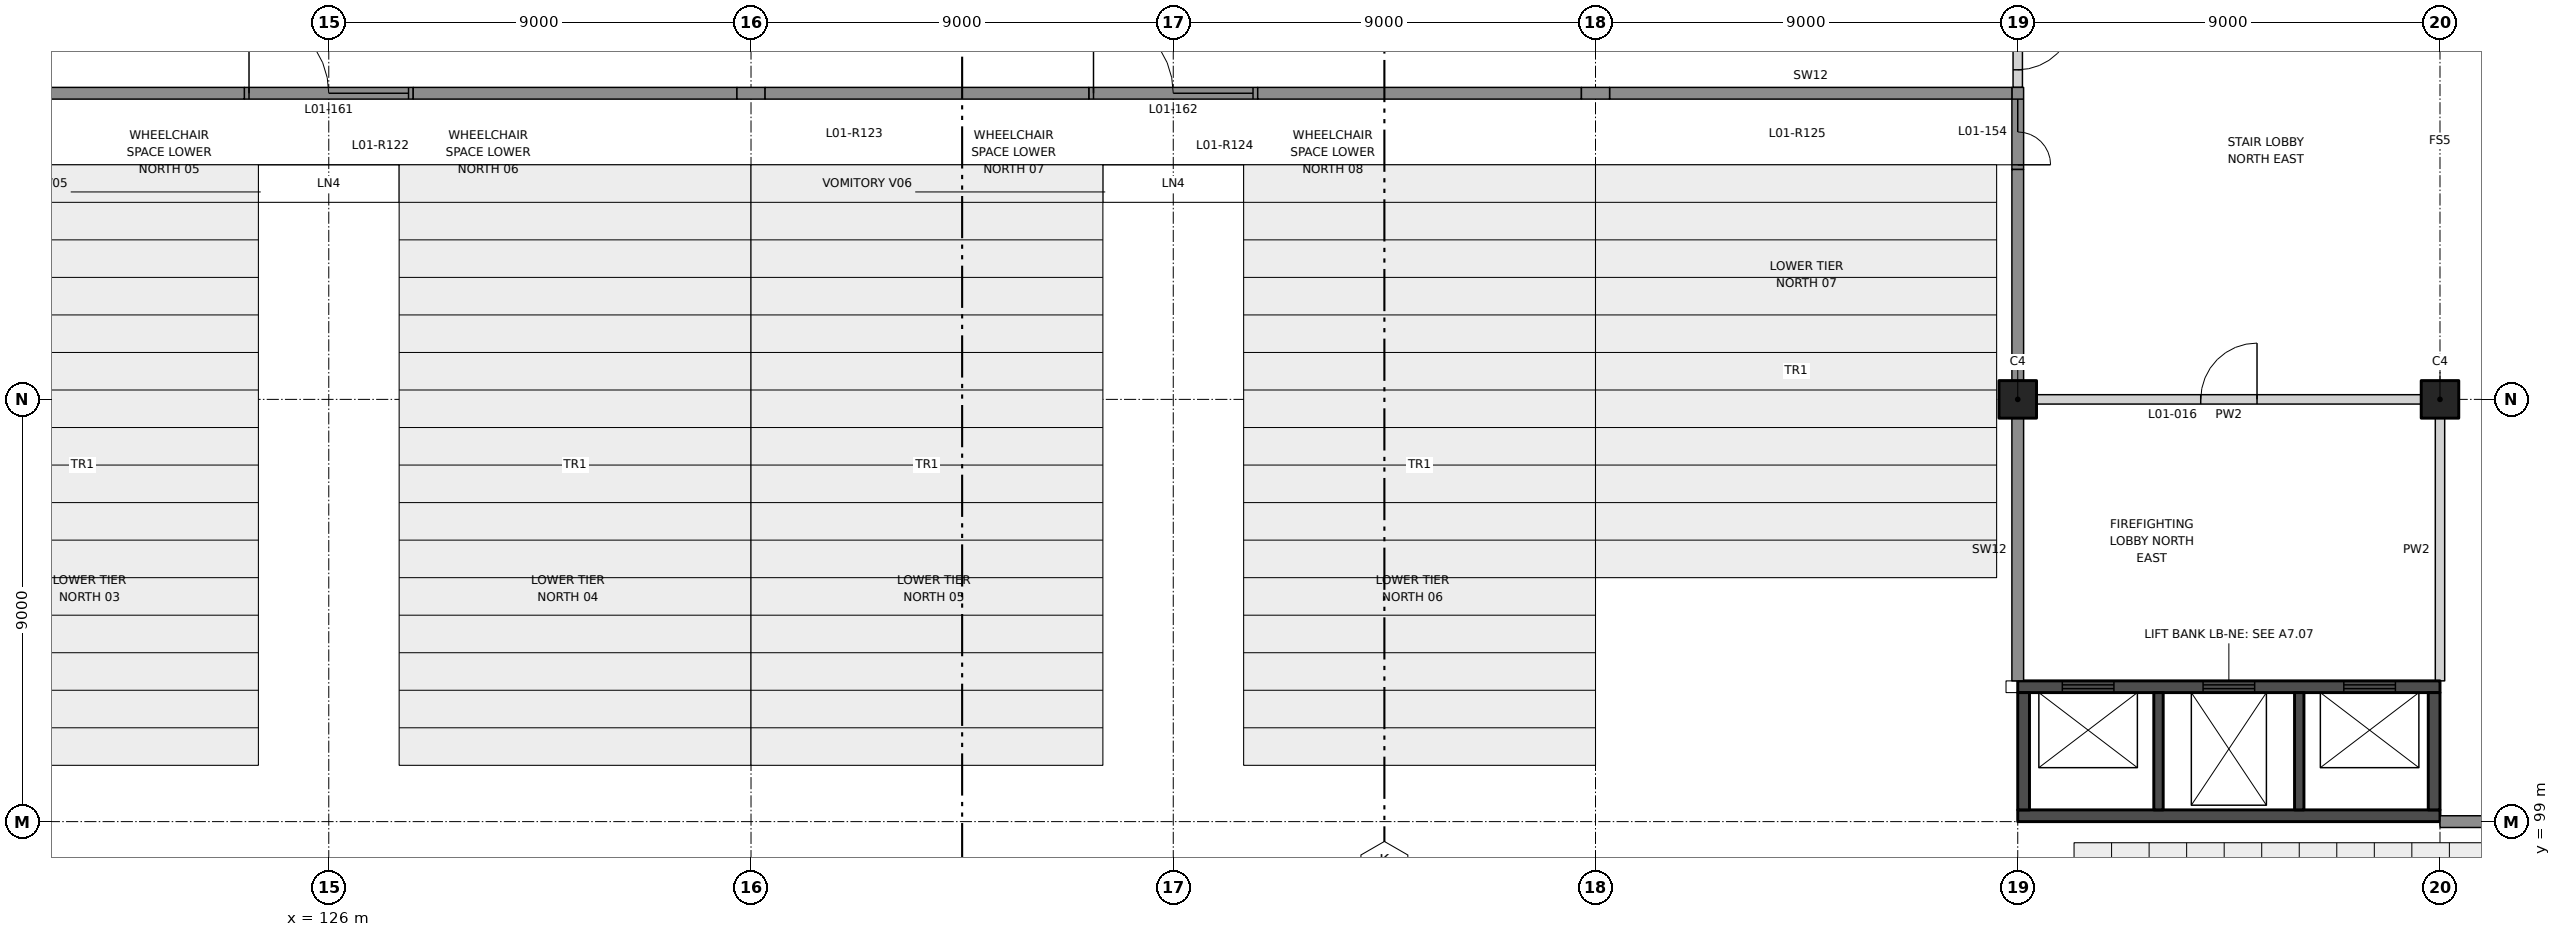
"""IFC4 building model, lengths in metres.
Left out: names, types, materials, properties, quantities, classifications, styles, units other than length and angle.
Written with IfcOpenShell. Run it as: python <this file> out.ifc"""

import sys

from ifc_helpers import new_model, si_unit, direction, frame, frame_2d, origin, origin_2d, place, context, subcontext, project, spatial, rectangle, extrude, element, fill, save


model = new_model("IFC4")
c1 = context("Model", 3, precision=1e-05, world=origin(), true_north=direction((0.0, 1.0)))
c2 = subcontext(c1, "Body", "Model", "MODEL_VIEW")
j1 = project(units=[si_unit("LENGTHUNIT", "METRE"), si_unit("PLANEANGLEUNIT", "RADIAN")], contexts=[c1])
p1 = place(None, origin())
s1 = spatial("IfcSite", under=j1, at=p1, CompositionType="ELEMENT")
p2 = place(p1, origin())
s2 = spatial("IfcBuilding", under=s1, at=p2, CompositionType="ELEMENT")
p3 = place(p2, frame((0.0, 0.0, 7.0)))
s3 = spatial("IfcBuildingStorey", under=s2, at=p3, CompositionType="ELEMENT", Elevation=7.0)
for number, where, z_axis, x_axis in (
    (1, (162.0, 108.0, 0.0), (0.0, 0.0, 1.0), (1.0, 0.0, 0.0)),
    (2, (171.0, 108.0, 0.0), (0.0, 0.0, 1.0), (1.0, 0.0, 0.0)),
):
    element("IfcColumn", number, at=place(p3, frame(where, z_axis=z_axis, x_axis=x_axis)), inside=s3, PredefinedType="COLUMN", context=c2, shape_type="SweptSolid", body=[
        extrude(rectangle(XDim=0.8, YDim=0.8, at=origin_2d()), origin(), (0.0, 0.0, 1.0), 4.5),
    ])
p4 = place(p3, frame((162.4, 108.0, 0.0), z_axis=(0.0, 0.0, 1.0), x_axis=(1.0, 0.0, 0.0)))
e3 = element("IfcWall", 3, at=p4, inside=s3, PredefinedType="PARTITIONING", context=c2, shape_type="SweptSolid", body=[
    extrude(rectangle(XDim=8.2, YDim=0.2, at=frame_2d((4.1, 0.0))), origin(), (0.0, 0.0, 1.0), 3.25),
])
p5 = place(p4, frame((3.5, 0.0, 0.0)))
e4 = element("IfcOpeningElement", 4, at=p5, cuts=e3, PredefinedType="OPENING", context=c2, shape_type="SweptSolid", body=[
    extrude(rectangle(XDim=1.2, YDim=2.1, at=frame_2d((0.6, 1.05))), frame((0.0, 0.11, 0.0), z_axis=(0.0, -1.0, 0.0), x_axis=(1.0, 0.0, 0.0)), (0.0, 0.0, 1.0), 0.22),
])
p6 = place(p3, frame((162.0, 114.65, 0.0), z_axis=(0.0, 0.0, 1.0), x_axis=(0.0, 1.0, 0.0)))
e5 = element("IfcWall", 5, at=p6, inside=s3, PredefinedType="PARTITIONING", context=c2, shape_type="SweptSolid", body=[
    extrude(rectangle(XDim=1.95, YDim=0.2, at=frame_2d((0.975, 0.0))), origin(), (0.0, 0.0, 1.0), 3.15),
])
p7 = place(p6, frame((0.375, 0.0, 0.0)))
e6 = element("IfcOpeningElement", 6, at=p7, cuts=e5, PredefinedType="OPENING", context=c2, shape_type="SweptSolid", body=[
    extrude(rectangle(XDim=1.2, YDim=2.1, at=frame_2d((0.6, 1.05))), frame((0.0, 0.11, 0.0), z_axis=(0.0, -1.0, 0.0), x_axis=(1.0, 0.0, 0.0)), (0.0, 0.0, 1.0), 0.22),
])
p8 = place(p3, frame((171.0, 102.0, 0.0), z_axis=(0.0, 0.0, 1.0), x_axis=(0.0, 1.0, 0.0)))
e7 = element("IfcWall", 7, at=p8, inside=s3, PredefinedType="PARTITIONING", context=c2, shape_type="SweptSolid", body=[
    extrude(rectangle(XDim=5.6, YDim=0.2, at=frame_2d((2.8, 0.0))), origin(), (0.0, 0.0, 1.0), 3.45),
])
p9 = place(p3, frame((162.0, 101.875, 0.0), z_axis=(0.0, 0.0, 1.0), x_axis=(1.0, 0.0, 0.0)))
e8 = element("IfcWall", 8, at=p9, inside=s3, PredefinedType="SHEAR", context=c2, shape_type="SweptSolid", body=[
    extrude(rectangle(XDim=9.0, YDim=0.25, at=frame_2d((4.5, 0.0))), origin(), (0.0, 0.0, 1.0), 4.5),
])
p10 = place(p9, frame((0.95, 0.0, 0.0)))
e9 = element("IfcOpeningElement", 9, at=p10, cuts=e8, PredefinedType="OPENING", context=c2, shape_type="SweptSolid", body=[
    extrude(rectangle(XDim=1.1, YDim=2.1, at=frame_2d((0.55, 1.05))), frame((0.0, 0.135, 0.0), z_axis=(0.0, -1.0, 0.0), x_axis=(1.0, 0.0, 0.0)), (0.0, 0.0, 1.0), 0.27),
])
p11 = place(p9, frame((3.95, 0.0, 0.0)))
e10 = element("IfcOpeningElement", 10, at=p11, cuts=e8, PredefinedType="OPENING", context=c2, shape_type="SweptSolid", body=[
    extrude(rectangle(XDim=1.1, YDim=2.1, at=frame_2d((0.55, 1.05))), frame((0.0, 0.135, 0.0), z_axis=(0.0, -1.0, 0.0), x_axis=(1.0, 0.0, 0.0)), (0.0, 0.0, 1.0), 0.27),
])
p12 = place(p9, frame((6.95, 0.0, 0.0)))
e11 = element("IfcOpeningElement", 11, at=p12, cuts=e8, PredefinedType="OPENING", context=c2, shape_type="SweptSolid", body=[
    extrude(rectangle(XDim=1.1, YDim=2.1, at=frame_2d((0.55, 1.05))), frame((0.0, 0.135, 0.0), z_axis=(0.0, -1.0, 0.0), x_axis=(1.0, 0.0, 0.0)), (0.0, 0.0, 1.0), 0.27),
])
p13 = place(p3, frame((162.0, 99.125, 0.0), z_axis=(0.0, 0.0, 1.0), x_axis=(1.0, 0.0, 0.0)))
e12 = element("IfcWall", 12, at=p13, inside=s3, PredefinedType="SHEAR", context=c2, shape_type="SweptSolid", body=[
    extrude(rectangle(XDim=9.0, YDim=0.25, at=frame_2d((4.5, 0.0))), origin(), (0.0, 0.0, 1.0), 4.5),
])
for number, where, z_axis, x_axis in (
    (13, (162.125, 99.25, 0.0), (0.0, 0.0, 1.0), (0.0, 1.0, 0.0)),
    (14, (170.875, 99.25, 0.0), (0.0, 0.0, 1.0), (0.0, 1.0, 0.0)),
):
    element("IfcWall", number, at=place(p3, frame(where, z_axis=z_axis, x_axis=x_axis)), inside=s3, PredefinedType="SHEAR", context=c2, shape_type="SweptSolid", body=[
        extrude(rectangle(XDim=2.5, YDim=0.25, at=frame_2d((1.25, 0.0))), origin(), (0.0, 0.0, 1.0), 4.5),
    ])
for number, where, z_axis, x_axis in (
    (15, (165.0, 99.25, 0.0), (0.0, 0.0, 1.0), (0.0, 1.0, 0.0)),
    (16, (168.0, 99.25, 0.0), (0.0, 0.0, 1.0), (0.0, 1.0, 0.0)),
):
    element("IfcWall", number, at=place(p3, frame(where, z_axis=z_axis, x_axis=x_axis)), inside=s3, PredefinedType="SHEAR", context=c2, shape_type="SweptSolid", body=[
        extrude(rectangle(XDim=2.5, YDim=0.2, at=frame_2d((1.25, 0.0))), origin(), (0.0, 0.0, 1.0), 4.5),
    ])
p14 = place(p3, frame((162.0, 112.9, 0.0), z_axis=(0.0, 0.0, 1.0), x_axis=(0.0, 1.0, 0.0)))
e17 = element("IfcWall", 17, at=p14, inside=s3, PredefinedType="SOLIDWALL", context=c2, shape_type="SweptSolid", body=[
    extrude(rectangle(XDim=1.75, YDim=0.25, at=frame_2d((0.875, 0.0))), origin(), (0.0, 0.0, 1.0), 3.15),
])
p15 = place(p14, frame((0.1, 0.0, 0.0)))
e18 = element("IfcOpeningElement", 18, at=p15, cuts=e17, PredefinedType="OPENING", context=c2, shape_type="SweptSolid", body=[
    extrude(rectangle(XDim=1.4, YDim=2.4, at=frame_2d((0.7, 1.2))), frame((0.0, 0.135, 0.0), z_axis=(0.0, -1.0, 0.0), x_axis=(1.0, 0.0, 0.0)), (0.0, 0.0, 1.0), 0.27),
])
p16 = place(p3, frame((162.0, 102.0, 0.0), z_axis=(0.0, 0.0, 1.0), x_axis=(0.0, 1.0, 0.0)))
e19 = element("IfcWall", 19, at=p16, inside=s3, PredefinedType="SOLIDWALL", context=c2, shape_type="SweptSolid", body=[
    extrude(rectangle(XDim=5.6, YDim=0.25, at=frame_2d((2.8, 0.0))), origin(), (0.0, 0.0, 1.0), 3.45),
])
p17 = place(p3, frame((162.0, 108.4, 0.0), z_axis=(0.0, 0.0, 1.0), x_axis=(0.0, 1.0, 0.0)))
e20 = element("IfcWall", 20, at=p17, inside=s3, PredefinedType="SOLIDWALL", context=c2, shape_type="SweptSolid", body=[
    extrude(rectangle(XDim=4.5, YDim=0.25, at=frame_2d((2.25, 0.0))), origin(), (0.0, 0.0, 1.0), 3.15),
])
p18 = place(p3, frame((171.0, 99.0, 0.0), z_axis=(0.0, 0.0, 1.0), x_axis=(1.0, 0.0, 0.0)))
e21 = element("IfcWall", 21, at=p18, inside=s3, PredefinedType="SOLIDWALL", context=c2, shape_type="SweptSolid", body=[
    extrude(rectangle(XDim=4.9, YDim=0.25, at=frame_2d((2.45, 0.0))), origin(), (0.0, 0.0, 1.0), 3.15),
])
p19 = place(p3, frame((124.2, 114.525, 0.0), z_axis=(0.0, 0.0, 1.0), x_axis=(1.0, 0.0, 0.0)))
e22 = element("IfcWall", 22, at=p19, inside=s3, PredefinedType="SOLIDWALL", context=c2, shape_type="SweptSolid", body=[
    extrude(rectangle(XDim=3.6, YDim=0.25, at=frame_2d((1.8, 0.0))), origin(), (0.0, 0.0, 1.0), 3.15),
])
p20 = place(p19, frame((0.1, 0.0, 0.0)))
e23 = element("IfcOpeningElement", 23, at=p20, cuts=e22, PredefinedType="OPENING", context=c2, shape_type="SweptSolid", body=[
    extrude(rectangle(XDim=3.4, YDim=2.4, at=frame_2d((1.7, 1.2))), frame((0.0, 0.135, 0.0), z_axis=(0.0, -1.0, 0.0), x_axis=(1.0, 0.0, 0.0)), (0.0, 0.0, 1.0), 0.27),
])
p21 = place(p3, frame((142.2, 114.525, 0.0), z_axis=(0.0, 0.0, 1.0), x_axis=(1.0, 0.0, 0.0)))
e24 = element("IfcWall", 24, at=p21, inside=s3, PredefinedType="SOLIDWALL", context=c2, shape_type="SweptSolid", body=[
    extrude(rectangle(XDim=3.6, YDim=0.25, at=frame_2d((1.8, 0.0))), origin(), (0.0, 0.0, 1.0), 3.15),
])
p22 = place(p21, frame((0.1, 0.0, 0.0)))
e25 = element("IfcOpeningElement", 25, at=p22, cuts=e24, PredefinedType="OPENING", context=c2, shape_type="SweptSolid", body=[
    extrude(rectangle(XDim=3.4, YDim=2.4, at=frame_2d((1.7, 1.2))), frame((0.0, 0.135, 0.0), z_axis=(0.0, -1.0, 0.0), x_axis=(1.0, 0.0, 0.0)), (0.0, 0.0, 1.0), 0.27),
])
for number, where, z_axis, x_axis in (
    (26, (117.3, 114.525, 0.0), (0.0, 0.0, 1.0), (1.0, 0.0, 0.0)),
    (27, (127.8, 114.525, 0.0), (0.0, 0.0, 1.0), (1.0, 0.0, 0.0)),
):
    element("IfcWall", number, at=place(p3, frame(where, z_axis=z_axis, x_axis=x_axis)), inside=s3, PredefinedType="SOLIDWALL", context=c2, shape_type="SweptSolid", body=[
        extrude(rectangle(XDim=6.9, YDim=0.25, at=frame_2d((3.45, 0.0))), origin(), (0.0, 0.0, 1.0), 3.15),
    ])
p23 = place(p3, frame((153.3, 114.525, 0.0), z_axis=(0.0, 0.0, 1.0), x_axis=(1.0, 0.0, 0.0)))
e28 = element("IfcWall", 28, at=p23, inside=s3, PredefinedType="SOLIDWALL", context=c2, shape_type="SweptSolid", body=[
    extrude(rectangle(XDim=8.575, YDim=0.25, at=frame_2d((4.288, 0.0))), origin(), (0.0, 0.0, 1.0), 3.15),
])
p24 = place(p3, frame((134.7, 114.525, 0.0), z_axis=(0.0, 0.0, 1.0), x_axis=(1.0, 0.0, 0.0)))
e29 = element("IfcWall", 29, at=p24, inside=s3, PredefinedType="SOLIDWALL", context=c2, shape_type="SweptSolid", body=[
    extrude(rectangle(XDim=0.6, YDim=0.25, at=frame_2d((0.3, 0.0))), origin(), (0.0, 0.0, 1.0), 4.15),
])
for number, where, z_axis, x_axis in (
    (30, (135.3, 114.525, 0.0), (0.0, 0.0, 1.0), (1.0, 0.0, 0.0)),
    (31, (145.8, 114.525, 0.0), (0.0, 0.0, 1.0), (1.0, 0.0, 0.0)),
):
    element("IfcWall", number, at=place(p3, frame(where, z_axis=z_axis, x_axis=x_axis)), inside=s3, PredefinedType="SOLIDWALL", context=c2, shape_type="SweptSolid", body=[
        extrude(rectangle(XDim=6.9, YDim=0.25, at=frame_2d((3.45, 0.0))), origin(), (0.0, 0.0, 1.0), 3.15),
    ])
p25 = place(p3, frame((152.7, 114.525, 0.0), z_axis=(0.0, 0.0, 1.0), x_axis=(1.0, 0.0, 0.0)))
e32 = element("IfcWall", 32, at=p25, inside=s3, PredefinedType="SOLIDWALL", context=c2, shape_type="SweptSolid", body=[
    extrude(rectangle(XDim=0.6, YDim=0.25, at=frame_2d((0.3, 0.0))), origin(), (0.0, 0.0, 1.0), 4.15),
])
p26 = place(p5, origin())
e33 = element("IfcDoor", 33, at=p26, inside=s3, OperationType="SINGLE_SWING_RIGHT", PredefinedType="DOOR", context=c2, shape_type="SweptSolid", body=[
    extrude(rectangle(XDim=1.2, YDim=2.1, at=frame_2d((0.6, 1.05))), frame((0.0, 0.025, 0.0), z_axis=(0.0, -1.0, 0.0), x_axis=(1.0, 0.0, 0.0)), (0.0, 0.0, 1.0), 0.05),
])
fill(e4, e33)
p27 = place(p7, frame((1.2, 0.0, 0.0), z_axis=(0.0, 0.0, 1.0), x_axis=(-1.0, 0.0, 0.0)))
e34 = element("IfcDoor", 34, at=p27, inside=s3, OperationType="SINGLE_SWING_LEFT", PredefinedType="DOOR", context=c2, shape_type="SweptSolid", body=[
    extrude(rectangle(XDim=1.2, YDim=2.1, at=frame_2d((0.6, 1.05))), frame((0.0, 0.025, 0.0), z_axis=(0.0, -1.0, 0.0), x_axis=(1.0, 0.0, 0.0)), (0.0, 0.0, 1.0), 0.05),
])
fill(e6, e34)
p28 = place(p10, origin())
e35 = element("IfcDoor", 35, at=p28, inside=s3, OperationType="DOUBLE_DOOR_SLIDING", PredefinedType="DOOR", context=c2, shape_type="SweptSolid", body=[
    extrude(rectangle(XDim=1.1, YDim=2.1, at=frame_2d((0.55, 1.05))), frame((0.0, 0.025, 0.0), z_axis=(0.0, -1.0, 0.0), x_axis=(1.0, 0.0, 0.0)), (0.0, 0.0, 1.0), 0.05),
])
fill(e9, e35)
p29 = place(p11, origin())
e36 = element("IfcDoor", 36, at=p29, inside=s3, OperationType="DOUBLE_DOOR_SLIDING", PredefinedType="DOOR", context=c2, shape_type="SweptSolid", body=[
    extrude(rectangle(XDim=1.1, YDim=2.1, at=frame_2d((0.55, 1.05))), frame((0.0, 0.025, 0.0), z_axis=(0.0, -1.0, 0.0), x_axis=(1.0, 0.0, 0.0)), (0.0, 0.0, 1.0), 0.05),
])
fill(e10, e36)
p30 = place(p12, origin())
e37 = element("IfcDoor", 37, at=p30, inside=s3, OperationType="DOUBLE_DOOR_SLIDING", PredefinedType="DOOR", context=c2, shape_type="SweptSolid", body=[
    extrude(rectangle(XDim=1.1, YDim=2.1, at=frame_2d((0.55, 1.05))), frame((0.0, 0.025, 0.0), z_axis=(0.0, -1.0, 0.0), x_axis=(1.0, 0.0, 0.0)), (0.0, 0.0, 1.0), 0.05),
])
fill(e11, e37)
p31 = place(p15, frame((1.4, 0.0, 0.0), z_axis=(0.0, 0.0, 1.0), x_axis=(-1.0, 0.0, 0.0)))
e38 = element("IfcDoor", 38, at=p31, inside=s3, OperationType="DOUBLE_DOOR_SINGLE_SWING", PredefinedType="DOOR", context=c2, shape_type="SweptSolid", body=[
    extrude(rectangle(XDim=1.4, YDim=2.4, at=frame_2d((0.7, 1.2))), frame((0.0, 0.025, 0.0), z_axis=(0.0, -1.0, 0.0), x_axis=(1.0, 0.0, 0.0)), (0.0, 0.0, 1.0), 0.05),
])
fill(e18, e38)
p32 = place(p20, origin())
e39 = element("IfcDoor", 39, at=p32, inside=s3, OperationType="DOUBLE_DOOR_SINGLE_SWING", PredefinedType="DOOR", context=c2, shape_type="SweptSolid", body=[
    extrude(rectangle(XDim=3.4, YDim=2.4, at=frame_2d((1.7, 1.2))), frame((0.0, 0.025, 0.0), z_axis=(0.0, -1.0, 0.0), x_axis=(1.0, 0.0, 0.0)), (0.0, 0.0, 1.0), 0.05),
])
fill(e23, e39)
p33 = place(p22, origin())
e40 = element("IfcDoor", 40, at=p33, inside=s3, OperationType="DOUBLE_DOOR_SINGLE_SWING", PredefinedType="DOOR", context=c2, shape_type="SweptSolid", body=[
    extrude(rectangle(XDim=3.4, YDim=2.4, at=frame_2d((1.7, 1.2))), frame((0.0, 0.025, 0.0), z_axis=(0.0, -1.0, 0.0), x_axis=(1.0, 0.0, 0.0)), (0.0, 0.0, 1.0), 0.05),
])
fill(e25, e40)
save(model, sys.argv[1])
